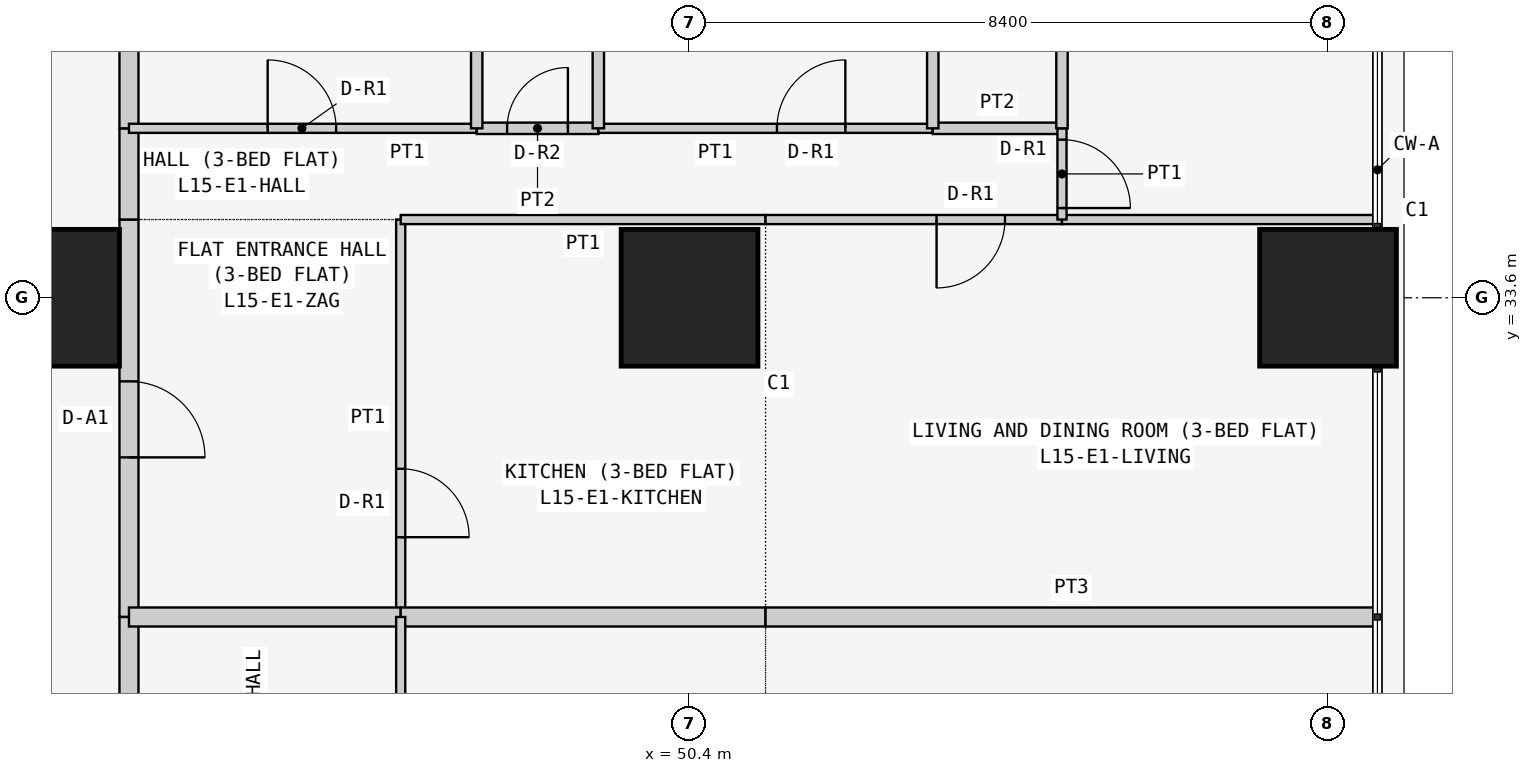
"""IFC4 building model, lengths in metres.
Left out: names, types, materials, properties, quantities, classifications, styles, units other than length and angle.
Written with IfcOpenShell. Run it as: python <this file> out.ifc"""

import sys

from ifc_helpers import new_model, si_unit, direction, frame, frame_2d, origin, origin_2d, place, context, subcontext, project, spatial, rectangle, extrude, element, fill, save


model = new_model("IFC4")
c1 = context("Model", 3, precision=1e-05, world=origin(), true_north=direction((0.0, 1.0)))
c2 = subcontext(c1, "Body", "Model", "MODEL_VIEW")
j1 = project(units=[si_unit("LENGTHUNIT", "METRE"), si_unit("PLANEANGLEUNIT", "RADIAN")], contexts=[c1])
p1 = place(None, origin())
s1 = spatial("IfcSite", under=j1, at=p1, CompositionType="ELEMENT")
p2 = place(p1, origin())
s2 = spatial("IfcBuilding", under=s1, at=p2, CompositionType="ELEMENT")
p3 = place(p2, frame((0.0, 0.0, 63.3)))
s3 = spatial("IfcBuildingStorey", under=s2, at=p3, CompositionType="ELEMENT", Elevation=63.3)
for number, where, z_axis, x_axis in (
    (1, (42.0, 33.6, 0.0), (0.0, 0.0, 1.0), (1.0, 0.0, 0.0)),
    (2, (50.4, 33.6, 0.0), (0.0, 0.0, 1.0), (1.0, 0.0, 0.0)),
    (3, (58.8, 33.6, 0.0), (0.0, 0.0, 1.0), (1.0, 0.0, 0.0)),
):
    element("IfcColumn", number, at=place(p3, frame(where, z_axis=z_axis, x_axis=x_axis)), inside=s3, PredefinedType="COLUMN", context=c2, shape_type="SweptSolid", body=[
        extrude(rectangle(XDim=1.8, YDim=1.8, at=origin_2d()), origin(), (0.0, 0.0, 1.0), 3.6),
    ])
p4 = place(p3, frame((43.025, 34.629, 0.0), z_axis=(0.0, 0.0, 1.0), x_axis=(0.0, -1.0, 0.0)))
e4 = element("IfcWall", 4, at=p4, inside=s3, PredefinedType="PARTITIONING", context=c2, shape_type="SweptSolid", body=[
    extrude(rectangle(XDim=5.229, YDim=0.25, at=frame_2d((2.615, 0.0))), origin(), (0.0, 0.0, 1.0), 3.45),
])
p5 = place(p4, frame((2.129, 0.0, 0.0)))
e5 = element("IfcOpeningElement", 5, at=p5, cuts=e4, PredefinedType="OPENING", context=c2, shape_type="SweptSolid", body=[
    extrude(rectangle(XDim=1.0, YDim=2.1, at=frame_2d((0.5, 1.05))), frame((0.0, 0.135, 0.0), z_axis=(0.0, -1.0, 0.0), x_axis=(1.0, 0.0, 0.0)), (0.0, 0.0, 1.0), 0.27),
])
p6 = place(p3, frame((43.025, 35.829, 0.0), z_axis=(0.0, 0.0, 1.0), x_axis=(0.0, -1.0, 0.0)))
e6 = element("IfcWall", 6, at=p6, inside=s3, PredefinedType="PARTITIONING", context=c2, shape_type="SweptSolid", body=[
    extrude(rectangle(XDim=1.2, YDim=0.25, at=frame_2d((0.6, 0.0))), origin(), (0.0, 0.0, 1.0), 3.45),
])
p7 = place(p3, frame((43.025, 42.7, 0.0), z_axis=(0.0, 0.0, 1.0), x_axis=(0.0, -1.0, 0.0)))
e7 = element("IfcWall", 7, at=p7, inside=s3, PredefinedType="PARTITIONING", context=c2, shape_type="SweptSolid", body=[
    extrude(rectangle(XDim=6.871, YDim=0.25, at=frame_2d((3.436, 0.0))), origin(), (0.0, 0.0, 1.0), 3.45),
])
p8 = place(p3, frame((43.025, 29.4, 0.0), z_axis=(0.0, 0.0, 1.0), x_axis=(0.0, -1.0, 0.0)))
e8 = element("IfcWall", 8, at=p8, inside=s3, PredefinedType="PARTITIONING", context=c2, shape_type="SweptSolid", body=[
    extrude(rectangle(XDim=5.229, YDim=0.25, at=frame_2d((2.615, 0.0))), origin(), (0.0, 0.0, 1.0), 3.45),
])
p9 = place(p8, frame((2.1, 0.0, 0.0)))
e9 = element("IfcOpeningElement", 9, at=p9, cuts=e8, PredefinedType="OPENING", context=c2, shape_type="SweptSolid", body=[
    extrude(rectangle(XDim=1.0, YDim=2.1, at=frame_2d((0.5, 1.05))), frame((0.0, 0.135, 0.0), z_axis=(0.0, -1.0, 0.0), x_axis=(1.0, 0.0, 0.0)), (0.0, 0.0, 1.0), 0.27),
])
p10 = place(p3, frame((46.6, 29.4, 0.0), z_axis=(0.0, 0.0, 1.0), x_axis=(0.0, 1.0, 0.0)))
e10 = element("IfcWall", 10, at=p10, inside=s3, PredefinedType="PARTITIONING", context=c2, shape_type="SweptSolid", body=[
    extrude(rectangle(XDim=5.229, YDim=0.12, at=frame_2d((2.615, 0.0))), origin(), (0.0, 0.0, 1.0), 3.45),
])
p11 = place(p10, frame((1.05, 0.0, 0.0)))
e11 = element("IfcOpeningElement", 11, at=p11, cuts=e10, PredefinedType="OPENING", context=c2, shape_type="SweptSolid", body=[
    extrude(rectangle(XDim=0.9, YDim=2.1, at=frame_2d((0.45, 1.05))), frame((0.0, 0.07, 0.0), z_axis=(0.0, -1.0, 0.0), x_axis=(1.0, 0.0, 0.0)), (0.0, 0.0, 1.0), 0.14),
])
p12 = place(p3, frame((43.025, 29.4, 0.0), z_axis=(0.0, 0.0, 1.0), x_axis=(1.0, 0.0, 0.0)))
e12 = element("IfcWall", 12, at=p12, inside=s3, PredefinedType="PARTITIONING", context=c2, shape_type="SweptSolid", body=[
    extrude(rectangle(XDim=3.575, YDim=0.25, at=frame_2d((1.788, 0.0))), origin(), (0.0, 0.0, 1.0), 3.45),
])
p13 = place(p3, frame((51.4, 34.629, 0.0), z_axis=(0.0, 0.0, 1.0), x_axis=(-1.0, 0.0, 0.0)))
e13 = element("IfcWall", 13, at=p13, inside=s3, PredefinedType="PARTITIONING", context=c2, shape_type="SweptSolid", body=[
    extrude(rectangle(XDim=4.8, YDim=0.12, at=frame_2d((2.4, 0.0))), origin(), (0.0, 0.0, 1.0), 3.45),
])
p14 = place(p3, frame((46.6, 29.4, 0.0), z_axis=(0.0, 0.0, 1.0), x_axis=(1.0, 0.0, 0.0)))
e14 = element("IfcWall", 14, at=p14, inside=s3, PredefinedType="PARTITIONING", context=c2, shape_type="SweptSolid", body=[
    extrude(rectangle(XDim=4.8, YDim=0.25, at=frame_2d((2.4, 0.0))), origin(), (0.0, 0.0, 1.0), 3.45),
])
p15 = place(p3, frame((55.3, 34.629, 0.0), z_axis=(0.0, 0.0, 1.0), x_axis=(-1.0, 0.0, 0.0)))
e15 = element("IfcWall", 15, at=p15, inside=s3, PredefinedType="PARTITIONING", context=c2, shape_type="SweptSolid", body=[
    extrude(rectangle(XDim=3.9, YDim=0.12, at=frame_2d((1.95, 0.0))), origin(), (0.0, 0.0, 1.0), 3.45),
])
p16 = place(p15, frame((0.75, 0.0, 0.0)))
e16 = element("IfcOpeningElement", 16, at=p16, cuts=e15, PredefinedType="OPENING", context=c2, shape_type="SweptSolid", body=[
    extrude(rectangle(XDim=0.9, YDim=2.1, at=frame_2d((0.45, 1.05))), frame((0.0, 0.07, 0.0), z_axis=(0.0, -1.0, 0.0), x_axis=(1.0, 0.0, 0.0)), (0.0, 0.0, 1.0), 0.14),
])
p17 = place(p3, frame((59.45, 34.629, 0.0), z_axis=(0.0, 0.0, 1.0), x_axis=(-1.0, 0.0, 0.0)))
e17 = element("IfcWall", 17, at=p17, inside=s3, PredefinedType="PARTITIONING", context=c2, shape_type="SweptSolid", body=[
    extrude(rectangle(XDim=4.15, YDim=0.12, at=frame_2d((2.075, 0.0))), origin(), (0.0, 0.0, 1.0), 3.45),
])
p18 = place(p3, frame((51.4, 29.4, 0.0), z_axis=(0.0, 0.0, 1.0), x_axis=(1.0, 0.0, 0.0)))
e18 = element("IfcWall", 18, at=p18, inside=s3, PredefinedType="PARTITIONING", context=c2, shape_type="SweptSolid", body=[
    extrude(rectangle(XDim=8.05, YDim=0.25, at=frame_2d((4.025, 0.0))), origin(), (0.0, 0.0, 1.0), 3.45),
])
p19 = place(p3, frame((47.6, 35.829, 0.0), z_axis=(0.0, 0.0, 1.0), x_axis=(-1.0, 0.0, 0.0)))
e19 = element("IfcWall", 19, at=p19, inside=s3, PredefinedType="PARTITIONING", context=c2, shape_type="SweptSolid", body=[
    extrude(rectangle(XDim=4.575, YDim=0.12, at=frame_2d((2.288, 0.0))), origin(), (0.0, 0.0, 1.0), 3.45),
])
p20 = place(p19, frame((1.85, 0.0, 0.0)))
e20 = element("IfcOpeningElement", 20, at=p20, cuts=e19, PredefinedType="OPENING", context=c2, shape_type="SweptSolid", body=[
    extrude(rectangle(XDim=0.9, YDim=2.1, at=frame_2d((0.45, 1.05))), frame((0.0, 0.07, 0.0), z_axis=(0.0, -1.0, 0.0), x_axis=(1.0, 0.0, 0.0)), (0.0, 0.0, 1.0), 0.14),
])
p21 = place(p3, frame((49.2, 35.829, 0.0), z_axis=(0.0, 0.0, 1.0), x_axis=(-1.0, 0.0, 0.0)))
e21 = element("IfcWall", 21, at=p21, inside=s3, PredefinedType="PARTITIONING", context=c2, shape_type="SweptSolid", body=[
    extrude(rectangle(XDim=1.6, YDim=0.15, at=frame_2d((0.8, 0.0))), origin(), (0.0, 0.0, 1.0), 3.45),
])
p22 = place(p21, frame((0.4, 0.0, 0.0)))
e22 = element("IfcOpeningElement", 22, at=p22, cuts=e21, PredefinedType="OPENING", context=c2, shape_type="SweptSolid", body=[
    extrude(rectangle(XDim=0.8, YDim=2.1, at=frame_2d((0.4, 1.05))), frame((0.0, 0.085, 0.0), z_axis=(0.0, -1.0, 0.0), x_axis=(1.0, 0.0, 0.0)), (0.0, 0.0, 1.0), 0.17),
])
p23 = place(p3, frame((53.6, 35.829, 0.0), z_axis=(0.0, 0.0, 1.0), x_axis=(-1.0, 0.0, 0.0)))
e23 = element("IfcWall", 23, at=p23, inside=s3, PredefinedType="PARTITIONING", context=c2, shape_type="SweptSolid", body=[
    extrude(rectangle(XDim=4.4, YDim=0.12, at=frame_2d((2.2, 0.0))), origin(), (0.0, 0.0, 1.0), 3.45),
])
p24 = place(p23, frame((1.15, 0.0, 0.0)))
e24 = element("IfcOpeningElement", 24, at=p24, cuts=e23, PredefinedType="OPENING", context=c2, shape_type="SweptSolid", body=[
    extrude(rectangle(XDim=0.9, YDim=2.1, at=frame_2d((0.45, 1.05))), frame((0.0, 0.07, 0.0), z_axis=(0.0, -1.0, 0.0), x_axis=(1.0, 0.0, 0.0)), (0.0, 0.0, 1.0), 0.14),
])
p25 = place(p3, frame((55.3, 35.829, 0.0), z_axis=(0.0, 0.0, 1.0), x_axis=(-1.0, 0.0, 0.0)))
e25 = element("IfcWall", 25, at=p25, inside=s3, PredefinedType="PARTITIONING", context=c2, shape_type="SweptSolid", body=[
    extrude(rectangle(XDim=1.7, YDim=0.15, at=frame_2d((0.85, 0.0))), origin(), (0.0, 0.0, 1.0), 3.45),
])
p26 = place(p3, frame((55.3, 34.629, 0.0), z_axis=(0.0, 0.0, 1.0), x_axis=(0.0, 1.0, 0.0)))
e26 = element("IfcWall", 26, at=p26, inside=s3, PredefinedType="PARTITIONING", context=c2, shape_type="SweptSolid", body=[
    extrude(rectangle(XDim=1.2, YDim=0.12, at=frame_2d((0.6, 0.0))), origin(), (0.0, 0.0, 1.0), 3.45),
])
p27 = place(p26, frame((0.151, 0.0, 0.0)))
e27 = element("IfcOpeningElement", 27, at=p27, cuts=e26, PredefinedType="OPENING", context=c2, shape_type="SweptSolid", body=[
    extrude(rectangle(XDim=0.9, YDim=2.1, at=frame_2d((0.45, 1.05))), frame((0.0, 0.07, 0.0), z_axis=(0.0, -1.0, 0.0), x_axis=(1.0, 0.0, 0.0)), (0.0, 0.0, 1.0), 0.14),
])
for number, where, z_axis, x_axis in (
    (28, (47.6, 35.829, 0.0), (0.0, 0.0, 1.0), (0.0, 1.0, 0.0)),
    (29, (49.2, 35.829, 0.0), (0.0, 0.0, 1.0), (0.0, 1.0, 0.0)),
    (30, (53.6, 35.829, 0.0), (0.0, 0.0, 1.0), (0.0, 1.0, 0.0)),
):
    element("IfcWall", number, at=place(p3, frame(where, z_axis=z_axis, x_axis=x_axis)), inside=s3, PredefinedType="PARTITIONING", context=c2, shape_type="SweptSolid", body=[
        extrude(rectangle(XDim=6.871, YDim=0.15, at=frame_2d((3.436, 0.0))), origin(), (0.0, 0.0, 1.0), 3.45),
    ])
p28 = place(p3, frame((55.3, 35.829, 0.0), z_axis=(0.0, 0.0, 1.0), x_axis=(0.0, 1.0, 0.0)))
e31 = element("IfcWall", 31, at=p28, inside=s3, PredefinedType="PARTITIONING", context=c2, shape_type="SweptSolid", body=[
    extrude(rectangle(XDim=6.871, YDim=0.15, at=frame_2d((3.436, 0.0))), origin(), (0.0, 0.0, 1.0), 3.45),
])
p29 = place(p28, frame((3.171, 0.0, 0.0)))
e32 = element("IfcOpeningElement", 32, at=p29, cuts=e31, PredefinedType="OPENING", context=c2, shape_type="SweptSolid", body=[
    extrude(rectangle(XDim=0.8, YDim=2.1, at=frame_2d((0.4, 1.05))), frame((0.0, 0.085, 0.0), z_axis=(0.0, -1.0, 0.0), x_axis=(1.0, 0.0, 0.0)), (0.0, 0.0, 1.0), 0.17),
])
p30 = place(p3, frame((46.6, 29.4, 0.0), z_axis=(0.0, 0.0, 1.0), x_axis=(0.0, -1.0, 0.0)))
e33 = element("IfcWall", 33, at=p30, inside=s3, PredefinedType="PARTITIONING", context=c2, shape_type="SweptSolid", body=[
    extrude(rectangle(XDim=5.229, YDim=0.12, at=frame_2d((2.615, 0.0))), origin(), (0.0, 0.0, 1.0), 3.45),
])
p31 = place(p30, frame((1.05, 0.0, 0.0)))
e34 = element("IfcOpeningElement", 34, at=p31, cuts=e33, PredefinedType="OPENING", context=c2, shape_type="SweptSolid", body=[
    extrude(rectangle(XDim=0.9, YDim=2.1, at=frame_2d((0.45, 1.05))), frame((0.0, 0.07, 0.0), z_axis=(0.0, -1.0, 0.0), x_axis=(1.0, 0.0, 0.0)), (0.0, 0.0, 1.0), 0.14),
])
p32 = place(p5, origin())
e35 = element("IfcDoor", 35, at=p32, inside=s3, OperationType="SINGLE_SWING_RIGHT", PredefinedType="DOOR", context=c2, shape_type="SweptSolid", body=[
    extrude(rectangle(XDim=1.0, YDim=2.1, at=frame_2d((0.5, 1.05))), frame((0.0, 0.025, 0.0), z_axis=(0.0, -1.0, 0.0), x_axis=(1.0, 0.0, 0.0)), (0.0, 0.0, 1.0), 0.05),
])
fill(e5, e35)
p33 = place(p11, frame((0.9, 0.0, 0.0), z_axis=(0.0, 0.0, 1.0), x_axis=(-1.0, 0.0, 0.0)))
e36 = element("IfcDoor", 36, at=p33, inside=s3, OperationType="SINGLE_SWING_RIGHT", PredefinedType="DOOR", context=c2, shape_type="SweptSolid", body=[
    extrude(rectangle(XDim=0.9, YDim=2.1, at=frame_2d((0.45, 1.05))), frame((0.0, 0.025, 0.0), z_axis=(0.0, -1.0, 0.0), x_axis=(1.0, 0.0, 0.0)), (0.0, 0.0, 1.0), 0.05),
])
fill(e11, e36)
p34 = place(p16, origin())
e37 = element("IfcDoor", 37, at=p34, inside=s3, OperationType="SINGLE_SWING_RIGHT", PredefinedType="DOOR", context=c2, shape_type="SweptSolid", body=[
    extrude(rectangle(XDim=0.9, YDim=2.1, at=frame_2d((0.45, 1.05))), frame((0.0, 0.025, 0.0), z_axis=(0.0, -1.0, 0.0), x_axis=(1.0, 0.0, 0.0)), (0.0, 0.0, 1.0), 0.05),
])
fill(e16, e37)
p35 = place(p20, frame((0.9, 0.0, 0.0), z_axis=(0.0, 0.0, 1.0), x_axis=(-1.0, 0.0, 0.0)))
e38 = element("IfcDoor", 38, at=p35, inside=s3, OperationType="SINGLE_SWING_LEFT", PredefinedType="DOOR", context=c2, shape_type="SweptSolid", body=[
    extrude(rectangle(XDim=0.9, YDim=2.1, at=frame_2d((0.45, 1.05))), frame((0.0, 0.025, 0.0), z_axis=(0.0, -1.0, 0.0), x_axis=(1.0, 0.0, 0.0)), (0.0, 0.0, 1.0), 0.05),
])
fill(e20, e38)
p36 = place(p22, frame((0.8, 0.0, 0.0), z_axis=(0.0, 0.0, 1.0), x_axis=(-1.0, 0.0, 0.0)))
e39 = element("IfcDoor", 39, at=p36, inside=s3, OperationType="SINGLE_SWING_RIGHT", PredefinedType="DOOR", context=c2, shape_type="SweptSolid", body=[
    extrude(rectangle(XDim=0.8, YDim=2.1, at=frame_2d((0.4, 1.05))), frame((0.0, 0.025, 0.0), z_axis=(0.0, -1.0, 0.0), x_axis=(1.0, 0.0, 0.0)), (0.0, 0.0, 1.0), 0.05),
])
fill(e22, e39)
p37 = place(p24, frame((0.9, 0.0, 0.0), z_axis=(0.0, 0.0, 1.0), x_axis=(-1.0, 0.0, 0.0)))
e40 = element("IfcDoor", 40, at=p37, inside=s3, OperationType="SINGLE_SWING_RIGHT", PredefinedType="DOOR", context=c2, shape_type="SweptSolid", body=[
    extrude(rectangle(XDim=0.9, YDim=2.1, at=frame_2d((0.45, 1.05))), frame((0.0, 0.025, 0.0), z_axis=(0.0, -1.0, 0.0), x_axis=(1.0, 0.0, 0.0)), (0.0, 0.0, 1.0), 0.05),
])
fill(e24, e40)
p38 = place(p27, frame((0.9, 0.0, 0.0), z_axis=(0.0, 0.0, 1.0), x_axis=(-1.0, 0.0, 0.0)))
e41 = element("IfcDoor", 41, at=p38, inside=s3, OperationType="SINGLE_SWING_RIGHT", PredefinedType="DOOR", context=c2, shape_type="SweptSolid", body=[
    extrude(rectangle(XDim=0.9, YDim=2.1, at=frame_2d((0.45, 1.05))), frame((0.0, 0.025, 0.0), z_axis=(0.0, -1.0, 0.0), x_axis=(1.0, 0.0, 0.0)), (0.0, 0.0, 1.0), 0.05),
])
fill(e27, e41)
save(model, sys.argv[1])
